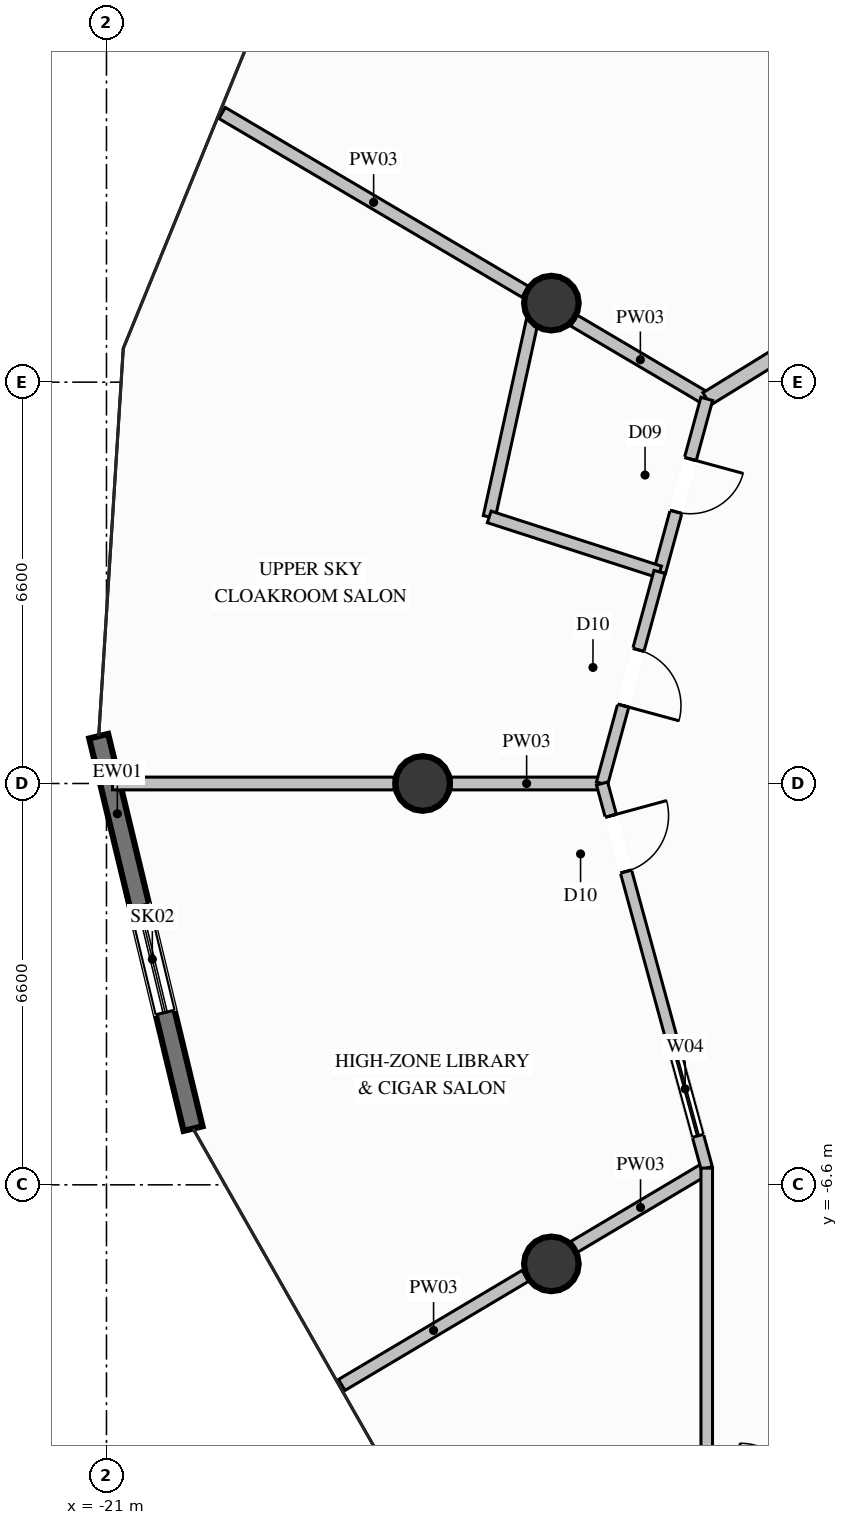
"""IFC4 building model, lengths in metres.
Left out: names, types, materials, properties, quantities, classifications, styles, units other than length and angle.
Written with IfcOpenShell. Run it as: python <this file> out.ifc"""

import sys

from ifc_helpers import new_model, si_unit, direction, frame, frame_2d, origin, origin_2d, place, context, subcontext, project, spatial, rectangle, circle, extrude, element, fill, save


model = new_model("IFC4")
c1 = context("Model", 3, precision=1e-05, world=origin(), true_north=direction((0.0, 1.0)))
c2 = subcontext(c1, "Body", "Model", "MODEL_VIEW")
j1 = project(units=[si_unit("LENGTHUNIT", "METRE"), si_unit("PLANEANGLEUNIT", "RADIAN")], contexts=[c1])
p1 = place(None, origin())
s1 = spatial("IfcSite", under=j1, at=p1, CompositionType="ELEMENT")
p2 = place(p1, origin())
s2 = spatial("IfcBuilding", under=s1, at=p2, CompositionType="ELEMENT")
p3 = place(p2, frame((0.0, 0.0, 168.6)))
s3 = spatial("IfcBuildingStorey", under=s2, at=p3, CompositionType="ELEMENT", Elevation=168.6)
for number, where, z_axis, x_axis in (
    (1, (-13.683, 7.9, 0.0), (0.0, 0.0, 1.0), (1.0, 0.0, 0.0)),
    (2, (-15.8, 0.0, 0.0), (0.0, 0.0, 1.0), (1.0, 0.0, 0.0)),
    (3, (-13.683, -7.9, 0.0), (0.0, 0.0, 1.0), (1.0, 0.0, 0.0)),
):
    element("IfcColumn", number, at=place(p3, frame(where, z_axis=z_axis, x_axis=x_axis)), inside=s3, PredefinedType="COLUMN", context=c2, shape_type="SweptSolid", body=[
        extrude(circle(Radius=0.45, at=origin_2d()), origin(), (0.0, 0.0, 1.0), 4.6),
    ])
p4 = place(p3, frame((-19.576, -5.675, 0.0), z_axis=(0.0, 0.0, 1.0), x_axis=(-0.23383620468, 0.972276004734, 0.0)))
e4 = element("IfcWall", 4, at=p4, inside=s3, PredefinedType="SOLIDWALL", context=c2, shape_type="SweptSolid", body=[
    extrude(rectangle(XDim=6.637, YDim=0.32, at=frame_2d((3.319, 0.0))), origin(), (0.0, 0.0, 1.0), 4.36),
])
p5 = place(p4, frame((1.964, 0.0, 0.6)))
e5 = element("IfcOpeningElement", 5, at=p5, cuts=e4, PredefinedType="OPENING", context=c2, shape_type="SweptSolid", body=[
    extrude(rectangle(XDim=1.8, YDim=2.2, at=frame_2d((0.9, 1.1))), frame((0.0, 0.17, 0.0), z_axis=(0.0, -1.0, 0.0), x_axis=(1.0, 0.0, 0.0)), (0.0, 0.0, 1.0), 0.34),
])
p6 = place(p3, frame((-11.128, 6.325, 0.0), z_axis=(0.0, 0.0, 1.0), x_axis=(-0.861259983765, 0.508164579998, 0.0)))
e6 = element("IfcWall", 6, at=p6, inside=s3, PredefinedType="PARTITIONING", context=c2, shape_type="SweptSolid", body=[
    extrude(rectangle(XDim=2.535, YDim=0.21, at=frame_2d((1.267, 0.0))), origin(), (0.0, 0.0, 1.0), 3.877),
])
p7 = place(p3, frame((-14.114, 8.087, 0.0), z_axis=(0.0, 0.0, 1.0), x_axis=(-0.861346971608, 0.508017120284, 0.0)))
e7 = element("IfcWall", 7, at=p7, inside=s3, PredefinedType="PARTITIONING", context=c2, shape_type="SweptSolid", body=[
    extrude(rectangle(XDim=5.788, YDim=0.21, at=frame_2d((2.894, 0.0))), origin(), (0.0, 0.0, 1.0), 4.36),
])
p8 = place(p3, frame((-12.85, 0.0, 0.0), z_axis=(0.0, 0.0, 1.0), x_axis=(-1.0, 0.0, 0.0)))
e8 = element("IfcWall", 8, at=p8, inside=s3, PredefinedType="PARTITIONING", context=c2, shape_type="SweptSolid", body=[
    extrude(rectangle(XDim=2.48, YDim=0.21, at=frame_2d((1.24, 0.0))), origin(), (0.0, 0.0, 1.0), 4.36),
])
p9 = place(p3, frame((-16.27, 0.0, 0.0), z_axis=(0.0, 0.0, 1.0), x_axis=(-1.0, 0.0, 0.0)))
e9 = element("IfcWall", 9, at=p9, inside=s3, PredefinedType="PARTITIONING", context=c2, shape_type="SweptSolid", body=[
    extrude(rectangle(XDim=4.631, YDim=0.21, at=frame_2d((2.315, 0.0))), origin(), (0.0, 0.0, 1.0), 4.36),
])
p10 = place(p3, frame((-11.128, -6.325, 0.0), z_axis=(0.0, 0.0, 1.0), x_axis=(-0.85972118737, -0.510763624377, 0.0)))
e10 = element("IfcWall", 10, at=p10, inside=s3, PredefinedType="PARTITIONING", context=c2, shape_type="SweptSolid", body=[
    extrude(rectangle(XDim=2.533, YDim=0.21, at=frame_2d((1.267, 0.0))), origin(), (0.0, 0.0, 1.0), 3.877),
])
p11 = place(p3, frame((-14.11, -8.096, 0.0), z_axis=(0.0, 0.0, 1.0), x_axis=(-0.859673605407, -0.510843706203, 0.0)))
e11 = element("IfcWall", 11, at=p11, inside=s3, PredefinedType="PARTITIONING", context=c2, shape_type="SweptSolid", body=[
    extrude(rectangle(XDim=3.514, YDim=0.21, at=frame_2d((1.757, 0.0))), origin(), (0.0, 0.0, 1.0), 4.36),
])
p12 = place(p3, frame((-11.128, 6.325, 0.0), z_axis=(0.0, 0.0, 1.0), x_axis=(0.851645088617, 0.524118920699, 0.0)))
e12 = element("IfcWall", 12, at=p12, inside=s3, PredefinedType="PARTITIONING", context=c2, shape_type="SweptSolid", body=[
    extrude(rectangle(XDim=4.436, YDim=0.24, at=frame_2d((2.218, 0.0))), origin(), (0.0, 0.0, 1.0), 4.36),
])
p13 = place(p12, frame((1.743, 0.0, 0.0)))
e13 = element("IfcOpeningElement", 13, at=p13, cuts=e12, PredefinedType="OPENING", context=c2, shape_type="SweptSolid", body=[
    extrude(rectangle(XDim=0.95, YDim=2.1, at=frame_2d((0.475, 1.05))), frame((0.0, 0.13, 0.0), z_axis=(0.0, -1.0, 0.0), x_axis=(1.0, 0.0, 0.0)), (0.0, 0.0, 1.0), 0.26),
])
p14 = place(p3, frame((-11.128, 6.325, 0.0), z_axis=(0.0, 0.0, 1.0), x_axis=(-0.262795224233, -0.964851631144, 0.0)))
e14 = element("IfcWall", 14, at=p14, inside=s3, PredefinedType="PLUMBINGWALL", context=c2, shape_type="SweptSolid", body=[
    extrude(rectangle(XDim=2.95, YDim=0.2, at=frame_2d((1.475, 0.0))), origin(), (0.0, 0.0, 1.0), 4.36),
])
p15 = place(p14, frame((1.025, 0.0, 0.0)))
e15 = element("IfcOpeningElement", 15, at=p15, cuts=e14, PredefinedType="OPENING", context=c2, shape_type="SweptSolid", body=[
    extrude(rectangle(XDim=0.9, YDim=2.1, at=frame_2d((0.45, 1.05))), frame((0.0, 0.11, 0.0), z_axis=(0.0, -1.0, 0.0), x_axis=(1.0, 0.0, 0.0)), (0.0, 0.0, 1.0), 0.22),
])
p16 = place(p3, frame((-13.918, 7.971, 0.0), z_axis=(0.0, 0.0, 1.0), x_axis=(-0.214339227221, -0.976759282359, 0.0)))
e16 = element("IfcWall", 16, at=p16, inside=s3, PredefinedType="PLUMBINGWALL", context=c2, shape_type="SweptSolid", body=[
    extrude(rectangle(XDim=3.672, YDim=0.2, at=frame_2d((1.836, 0.0))), origin(), (0.0, 0.0, 1.0), 3.929),
])
p17 = place(p3, frame((-11.903, 3.479, 0.0), z_axis=(0.0, 0.0, 1.0), x_axis=(-0.951593676243, 0.307358870596, 0.0)))
e17 = element("IfcWall", 17, at=p17, inside=s3, PredefinedType="PLUMBINGWALL", context=c2, shape_type="SweptSolid", body=[
    extrude(rectangle(XDim=2.945, YDim=0.2, at=frame_2d((1.472, 0.0))), origin(), (0.0, 0.0, 1.0), 4.36),
])
p18 = place(p3, frame((-11.903, 3.479, 0.0), z_axis=(0.0, 0.0, 1.0), x_axis=(-0.262653290471, -0.964890278221, 0.0)))
e18 = element("IfcWall", 18, at=p18, inside=s3, PredefinedType="PARTITIONING", context=c2, shape_type="SweptSolid", body=[
    extrude(rectangle(XDim=3.606, YDim=0.19, at=frame_2d((1.803, 0.0))), origin(), (0.0, 0.0, 1.0), 4.36),
])
p19 = place(p18, frame((1.328, 0.0, 0.0)))
e19 = element("IfcOpeningElement", 19, at=p19, cuts=e18, PredefinedType="OPENING", context=c2, shape_type="SweptSolid", body=[
    extrude(rectangle(XDim=0.95, YDim=2.1, at=frame_2d((0.475, 1.05))), frame((0.0, 0.105, 0.0), z_axis=(0.0, -1.0, 0.0), x_axis=(1.0, 0.0, 0.0)), (0.0, 0.0, 1.0), 0.21),
])
p20 = place(p3, frame((-12.85, 0.0, 0.0), z_axis=(0.0, 0.0, 1.0), x_axis=(0.262717156474, -0.964872890952, 0.0)))
e20 = element("IfcWall", 20, at=p20, inside=s3, PredefinedType="PARTITIONING", context=c2, shape_type="SweptSolid", body=[
    extrude(rectangle(XDim=6.555, YDim=0.19, at=frame_2d((3.278, 0.0))), origin(), (0.0, 0.0, 1.0), 4.36),
])
p21 = place(p20, frame((0.55, 0.0, 0.0)))
e21 = element("IfcOpeningElement", 21, at=p21, cuts=e20, PredefinedType="OPENING", context=c2, shape_type="SweptSolid", body=[
    extrude(rectangle(XDim=0.95, YDim=2.1, at=frame_2d((0.475, 1.05))), frame((0.0, 0.105, 0.0), z_axis=(0.0, -1.0, 0.0), x_axis=(1.0, 0.0, 0.0)), (0.0, 0.0, 1.0), 0.21),
])
p22 = place(p20, frame((4.405, 0.0, 0.9)))
e22 = element("IfcOpeningElement", 22, at=p22, cuts=e20, PredefinedType="OPENING", context=c2, shape_type="SweptSolid", body=[
    extrude(rectangle(XDim=1.6, YDim=1.4, at=frame_2d((0.8, 0.7))), frame((0.0, 0.105, 0.0), z_axis=(0.0, -1.0, 0.0), x_axis=(1.0, 0.0, 0.0)), (0.0, 0.0, 1.0), 0.21),
])
p23 = place(p3, frame((-11.128, -6.325, 0.0), z_axis=(0.0, 0.0, 1.0), x_axis=(0.0, -1.0, 0.0)))
e23 = element("IfcWall", 23, at=p23, inside=s3, PredefinedType="PARTITIONING", context=c2, shape_type="SweptSolid", body=[
    extrude(rectangle(XDim=5.475, YDim=0.19, at=frame_2d((2.738, 0.0))), origin(), (0.0, 0.0, 1.0), 4.36),
])
p24 = place(p5, origin())
e24 = element("IfcWindow", 24, at=p24, inside=s3, PartitioningType="SINGLE_PANEL", PredefinedType="SKYLIGHT", context=c2, shape_type="SweptSolid", body=[
    extrude(rectangle(XDim=1.8, YDim=2.2, at=frame_2d((0.9, 1.1))), frame((0.0, 0.03, 0.0), z_axis=(0.0, -1.0, 0.0), x_axis=(1.0, 0.0, 0.0)), (0.0, 0.0, 1.0), 0.06),
])
fill(e5, e24)
p25 = place(p15, origin())
e25 = element("IfcDoor", 25, at=p25, inside=s3, OperationType="SINGLE_SWING_LEFT", PredefinedType="DOOR", context=c2, shape_type="SweptSolid", body=[
    extrude(rectangle(XDim=0.9, YDim=2.1, at=frame_2d((0.45, 1.05))), frame((0.0, 0.025, 0.0), z_axis=(0.0, -1.0, 0.0), x_axis=(1.0, 0.0, 0.0)), (0.0, 0.0, 1.0), 0.05),
])
fill(e15, e25)
p26 = place(p19, origin())
e26 = element("IfcDoor", 26, at=p26, inside=s3, OperationType="SINGLE_SWING_RIGHT", PredefinedType="DOOR", context=c2, shape_type="SweptSolid", body=[
    extrude(rectangle(XDim=0.95, YDim=2.1, at=frame_2d((0.475, 1.05))), frame((0.0, 0.025, 0.0), z_axis=(0.0, -1.0, 0.0), x_axis=(1.0, 0.0, 0.0)), (0.0, 0.0, 1.0), 0.05),
])
fill(e19, e26)
p27 = place(p21, origin())
e27 = element("IfcDoor", 27, at=p27, inside=s3, OperationType="SINGLE_SWING_LEFT", PredefinedType="DOOR", context=c2, shape_type="SweptSolid", body=[
    extrude(rectangle(XDim=0.95, YDim=2.1, at=frame_2d((0.475, 1.05))), frame((0.0, 0.025, 0.0), z_axis=(0.0, -1.0, 0.0), x_axis=(1.0, 0.0, 0.0)), (0.0, 0.0, 1.0), 0.05),
])
fill(e21, e27)
p28 = place(p22, origin())
e28 = element("IfcWindow", 28, at=p28, inside=s3, PartitioningType="SINGLE_PANEL", PredefinedType="WINDOW", context=c2, shape_type="SweptSolid", body=[
    extrude(rectangle(XDim=1.6, YDim=1.4, at=frame_2d((0.8, 0.7))), frame((0.0, 0.03, 0.0), z_axis=(0.0, -1.0, 0.0), x_axis=(1.0, 0.0, 0.0)), (0.0, 0.0, 1.0), 0.06),
])
fill(e22, e28)
save(model, sys.argv[1])
